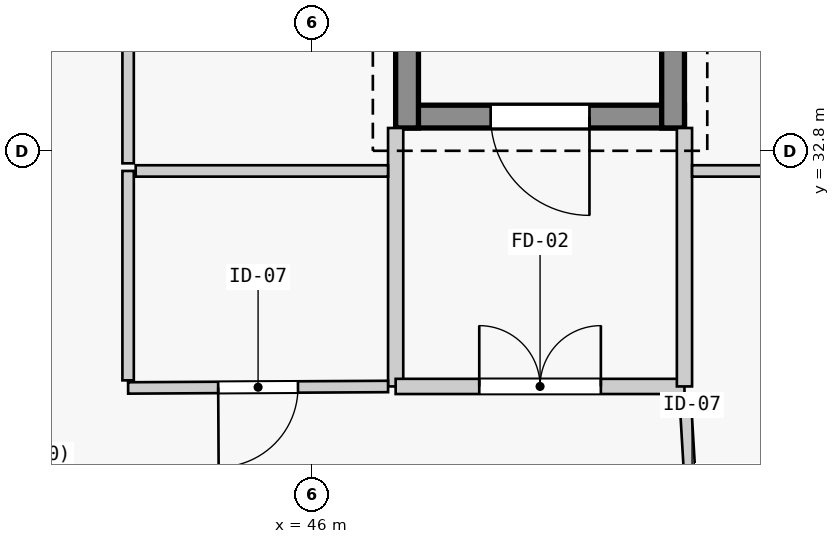
"""IFC4 building model, lengths in metres.
Left out: names, types, materials, properties, quantities, classifications, styles, units other than length and angle.
Written with IfcOpenShell. Run it as: python <this file> out.ifc"""

import sys

from ifc_helpers import new_model, si_unit, direction, frame, frame_2d, origin, place, context, subcontext, project, spatial, rectangle, extrude, element, fill, save


model = new_model("IFC4")
c1 = context("Model", 3, precision=1e-05, world=origin(), true_north=direction((0.0, 1.0)))
c2 = subcontext(c1, "Body", "Model", "MODEL_VIEW")
j1 = project(units=[si_unit("LENGTHUNIT", "METRE"), si_unit("PLANEANGLEUNIT", "RADIAN")], contexts=[c1])
p1 = place(None, origin())
s1 = spatial("IfcSite", under=j1, at=p1, CompositionType="ELEMENT")
p2 = place(p1, origin())
s2 = spatial("IfcBuilding", under=s1, at=p2, CompositionType="ELEMENT")
p3 = place(p2, frame((0.0, 0.0, 5.4)))
s3 = spatial("IfcBuildingStorey", under=s2, at=p3, CompositionType="ELEMENT", Elevation=5.4)
p4 = place(p3, frame((50.9, 33.25, 0.0), z_axis=(0.0, 0.0, 1.0), x_axis=(-1.0, 0.0, 0.0)))
e1 = element("IfcWall", 1, at=p4, inside=s3, PredefinedType="SHEAR", context=c2, shape_type="SweptSolid", body=[
    extrude(rectangle(XDim=3.8, YDim=0.3, at=frame_2d((1.9, 0.0))), origin(), (0.0, 0.0, 1.0), 3.94),
])
p5 = place(p4, frame((1.25, 0.0, 0.0)))
e2 = element("IfcOpeningElement", 2, at=p5, cuts=e1, PredefinedType="OPENING", context=c2, shape_type="SweptSolid", body=[
    extrude(rectangle(XDim=1.3, YDim=2.2, at=frame_2d((0.65, 1.1))), frame((0.0, 0.16, 0.0), z_axis=(0.0, -1.0, 0.0), x_axis=(1.0, 0.0, 0.0)), (0.0, 0.0, 1.0), 0.32),
])
for number, where, z_axis, x_axis in (
    (3, (47.25, 33.1, 0.0), (0.0, 0.0, 1.0), (0.0, 1.0, 0.0)),
    (4, (50.75, 41.2, 0.0), (0.0, 0.0, 1.0), (0.0, -1.0, 0.0)),
):
    element("IfcWall", number, at=place(p3, frame(where, z_axis=z_axis, x_axis=x_axis)), inside=s3, PredefinedType="SHEAR", context=c2, shape_type="SweptSolid", body=[
        extrude(rectangle(XDim=8.1, YDim=0.3, at=frame_2d((4.05, 0.0))), origin(), (0.0, 0.0, 1.0), 3.94),
    ])
p6 = place(p3, frame((47.1, 33.1, 0.0), z_axis=(0.0, 0.0, 1.0), x_axis=(0.0, -1.0, 0.0)))
e5 = element("IfcWall", 5, at=p6, inside=s3, PredefinedType="STANDARD", context=c2, shape_type="SweptSolid", body=[
    extrude(rectangle(XDim=3.4, YDim=0.2, at=frame_2d((1.7, 0.0))), origin(), (0.0, 0.0, 1.0), 3.22),
])
p7 = place(p3, frame((47.1, 29.7, 0.0), z_axis=(0.0, 0.0, 1.0), x_axis=(1.0, 0.0, 0.0)))
e6 = element("IfcWall", 6, at=p7, inside=s3, PredefinedType="STANDARD", context=c2, shape_type="SweptSolid", body=[
    extrude(rectangle(XDim=3.8, YDim=0.2, at=frame_2d((1.9, 0.0))), origin(), (0.0, 0.0, 1.0), 3.94),
])
p8 = place(p7, frame((1.1, 0.0, 0.0)))
e7 = element("IfcOpeningElement", 7, at=p8, cuts=e6, PredefinedType="OPENING", context=c2, shape_type="SweptSolid", body=[
    extrude(rectangle(XDim=1.6, YDim=2.2, at=frame_2d((0.8, 1.1))), frame((0.0, 0.11, 0.0), z_axis=(0.0, -1.0, 0.0), x_axis=(1.0, 0.0, 0.0)), (0.0, 0.0, 1.0), 0.22),
])
p9 = place(p3, frame((50.9, 29.7, 0.0), z_axis=(0.0, 0.0, 1.0), x_axis=(0.0, 1.0, 0.0)))
e8 = element("IfcWall", 8, at=p9, inside=s3, PredefinedType="STANDARD", context=c2, shape_type="SweptSolid", body=[
    extrude(rectangle(XDim=3.4, YDim=0.2, at=frame_2d((1.7, 0.0))), origin(), (0.0, 0.0, 1.0), 3.22),
])
p10 = place(p3, frame((51.094, 26.42, 0.0), z_axis=(0.0, 0.0, 1.0), x_axis=(-0.059009535749, 0.998257419051, 0.0)))
e9 = element("IfcWall", 9, at=p10, inside=s3, PredefinedType="PARTITIONING", context=c2, shape_type="SweptSolid", body=[
    extrude(rectangle(XDim=3.186, YDim=0.15, at=frame_2d((1.593, 0.0))), origin(), (0.0, 0.0, 1.0), 3.94),
])
p11 = place(p10, frame((1.068, 0.0, 0.0)))
e10 = element("IfcOpeningElement", 10, at=p11, cuts=e9, PredefinedType="OPENING", context=c2, shape_type="SweptSolid", body=[
    extrude(rectangle(XDim=1.05, YDim=2.2, at=frame_2d((0.525, 1.1))), frame((0.0, 0.085, 0.0), z_axis=(0.0, -1.0, 0.0), x_axis=(1.0, 0.0, 0.0)), (0.0, 0.0, 1.0), 0.17),
])
p12 = place(p3, frame((51.0, 32.535, 0.0), z_axis=(0.0, 0.0, 1.0), x_axis=(1.0, 0.0, 0.0)))
e11 = element("IfcWall", 11, at=p12, inside=s3, PredefinedType="PARTITIONING", context=c2, shape_type="SweptSolid", body=[
    extrude(rectangle(XDim=3.01, YDim=0.15, at=frame_2d((1.505, 0.0))), origin(), (0.0, 0.0, 1.0), 3.22),
])
p13 = place(p3, frame((47.0, 29.699, 0.0), z_axis=(0.0, 0.0, 1.0), x_axis=(-0.999983692511, -0.005710929141, 0.0)))
e12 = element("IfcWall", 12, at=p13, inside=s3, PredefinedType="PARTITIONING", context=c2, shape_type="SweptSolid", body=[
    extrude(rectangle(XDim=3.42, YDim=0.15, at=frame_2d((1.71, 0.0))), origin(), (0.0, 0.0, 1.0), 3.42),
])
p14 = place(p13, frame((1.185, 0.0, 0.0)))
e13 = element("IfcOpeningElement", 13, at=p14, cuts=e12, PredefinedType="OPENING", context=c2, shape_type="SweptSolid", body=[
    extrude(rectangle(XDim=1.05, YDim=2.2, at=frame_2d((0.525, 1.1))), frame((0.0, 0.085, 0.0), z_axis=(0.0, -1.0, 0.0), x_axis=(1.0, 0.0, 0.0)), (0.0, 0.0, 1.0), 0.17),
])
p15 = place(p3, frame((43.58, 29.78, 0.0), z_axis=(0.0, 0.0, 1.0), x_axis=(0.0, 1.0, 0.0)))
e14 = element("IfcWall", 14, at=p15, inside=s3, PredefinedType="PARTITIONING", context=c2, shape_type="SweptSolid", body=[
    extrude(rectangle(XDim=2.755, YDim=0.15, at=frame_2d((1.377, 0.0))), origin(), (0.0, 0.0, 1.0), 3.94),
])
p16 = place(p3, frame((43.68, 32.535, 0.0), z_axis=(0.0, 0.0, 1.0), x_axis=(1.0, 0.0, 0.0)))
e15 = element("IfcWall", 15, at=p16, inside=s3, PredefinedType="PARTITIONING", context=c2, shape_type="SweptSolid", body=[
    extrude(rectangle(XDim=3.32, YDim=0.15, at=frame_2d((1.66, 0.0))), origin(), (0.0, 0.0, 1.0), 3.22),
])
p17 = place(p3, frame((43.58, 32.635, 0.0), z_axis=(0.0, 0.0, 1.0), x_axis=(0.0, 1.0, 0.0)))
e16 = element("IfcWall", 16, at=p17, inside=s3, PredefinedType="PARTITIONING", context=c2, shape_type="SweptSolid", body=[
    extrude(rectangle(XDim=7.015, YDim=0.15, at=frame_2d((3.507, 0.0))), origin(), (0.0, 0.0, 1.0), 3.22),
])
p18 = place(p17, frame((2.982, 0.0, 0.0)))
e17 = element("IfcOpeningElement", 17, at=p18, cuts=e16, PredefinedType="OPENING", context=c2, shape_type="SweptSolid", body=[
    extrude(rectangle(XDim=1.05, YDim=2.2, at=frame_2d((0.525, 1.1))), frame((0.0, 0.085, 0.0), z_axis=(0.0, -1.0, 0.0), x_axis=(1.0, 0.0, 0.0)), (0.0, 0.0, 1.0), 0.17),
])
p19 = place(p17, frame((4.531, 0.0, 1.05)))
e18 = element("IfcOpeningElement", 18, at=p19, cuts=e16, PredefinedType="OPENING", context=c2, shape_type="SweptSolid", body=[
    extrude(rectangle(XDim=1.6, YDim=1.5, at=frame_2d((0.8, 0.75))), frame((0.0, 0.085, 0.0), z_axis=(0.0, -1.0, 0.0), x_axis=(1.0, 0.0, 0.0)), (0.0, 0.0, 1.0), 0.17),
])
p20 = place(p5, origin())
e19 = element("IfcDoor", 19, at=p20, inside=s3, OperationType="SINGLE_SWING_LEFT", PredefinedType="DOOR", context=c2, shape_type="SweptSolid", body=[
    extrude(rectangle(XDim=1.3, YDim=2.2, at=frame_2d((0.65, 1.1))), frame((0.0, 0.025, 0.0), z_axis=(0.0, -1.0, 0.0), x_axis=(1.0, 0.0, 0.0)), (0.0, 0.0, 1.0), 0.05),
])
fill(e2, e19)
p21 = place(p8, origin())
e20 = element("IfcDoor", 20, at=p21, inside=s3, OperationType="DOUBLE_DOOR_SINGLE_SWING", PredefinedType="DOOR", context=c2, shape_type="SweptSolid", body=[
    extrude(rectangle(XDim=1.6, YDim=2.2, at=frame_2d((0.8, 1.1))), frame((0.0, 0.025, 0.0), z_axis=(0.0, -1.0, 0.0), x_axis=(1.0, 0.0, 0.0)), (0.0, 0.0, 1.0), 0.05),
])
fill(e7, e20)
p22 = place(p14, origin())
e21 = element("IfcDoor", 21, at=p22, inside=s3, OperationType="SINGLE_SWING_RIGHT", PredefinedType="DOOR", context=c2, shape_type="SweptSolid", body=[
    extrude(rectangle(XDim=1.05, YDim=2.2, at=frame_2d((0.525, 1.1))), frame((0.0, 0.025, 0.0), z_axis=(0.0, -1.0, 0.0), x_axis=(1.0, 0.0, 0.0)), (0.0, 0.0, 1.0), 0.05),
])
fill(e13, e21)
save(model, sys.argv[1])
